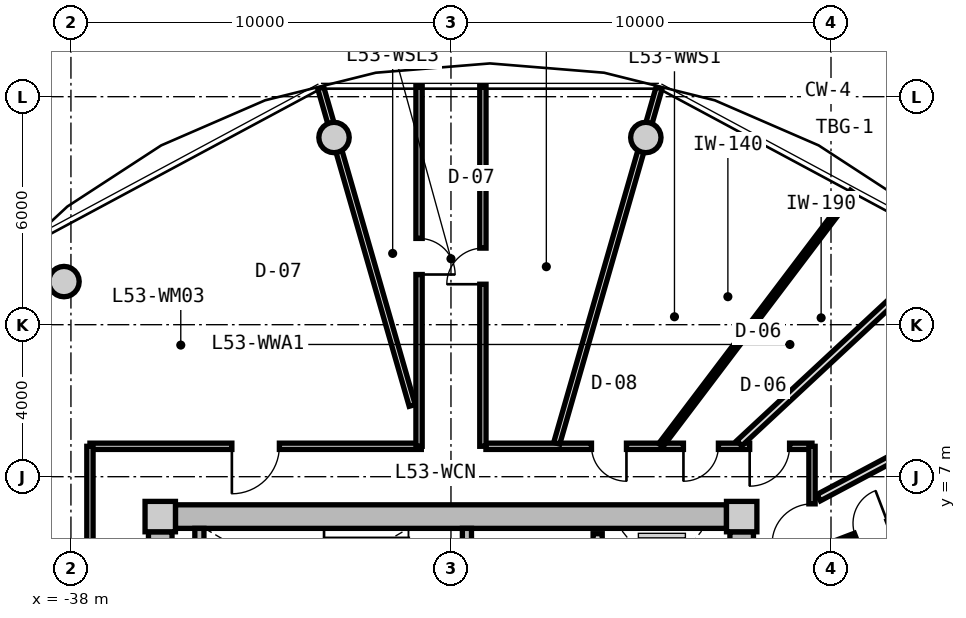
"""IFC4 building model, lengths in metres.
Left out: names, types, materials, properties, quantities, classifications, styles, units other than length and angle.
Written with IfcOpenShell. Run it as: python <this file> out.ifc"""

import sys

from ifc_helpers import new_model, si_unit, direction, frame, frame_2d, origin, origin_2d, place, context, subcontext, project, spatial, rectangle, circle, extrude, source, transform, mapped, element, fill, save


model = new_model("IFC4")
c1 = context("Model", 3, precision=1e-05, world=origin(), true_north=direction((0.0, 1.0)))
c2 = subcontext(c1, "Body", "Model", "MODEL_VIEW")
j1 = project(units=[si_unit("LENGTHUNIT", "METRE"), si_unit("PLANEANGLEUNIT", "RADIAN")], contexts=[c1])
p1 = place(None, origin())
s1 = spatial("IfcSite", under=j1, at=p1, CompositionType="ELEMENT")
p2 = place(p1, origin())
s2 = spatial("IfcBuilding", under=s1, at=p2, CompositionType="ELEMENT")
p3 = place(p2, frame((0.0, 0.0, 170.9)))
s3 = spatial("IfcBuildingStorey", under=s2, at=p3, CompositionType="ELEMENT", Elevation=170.9)
m1 = source(origin(), c2, "Body", "SweptSolid", [
    extrude(rectangle(XDim=0.8, YDim=0.8, at=origin_2d()), origin(), (0.0, 0.0, 1.0), 3.05),
])
for number, where, z_axis, x_axis in (
    (1, (-20.35, 5.95, 0.0), (0.0, 0.0, 1.0), (1.0, 0.0, 0.0)),
    (2, (-35.65, 5.95, 0.0), (0.0, 0.0, 1.0), (1.0, 0.0, 0.0)),
):
    element("IfcColumn", number, at=place(p3, frame(where, z_axis=z_axis, x_axis=x_axis)), inside=s3, PredefinedType="COLUMN", context=c2, shape_type="MappedRepresentation", body=[
        mapped(m1, transform((0.0, 0.0, 0.0), x_axis=(1.0, 0.0, 0.0), y_axis=(0.0, 1.0, 0.0), z_axis=(0.0, 0.0, 1.0), scale=1.0)),
    ])
m2 = source(origin(), c2, "Body", "SweptSolid", [
    extrude(rectangle(XDim=14.5, YDim=0.62, at=frame_2d((7.25, 0.0))), origin(), (0.0, 0.0, 1.0), 2.81),
])
p4 = place(p3, frame((-35.25, 5.95, 0.0), z_axis=(0.0, 0.0, 1.0), x_axis=(1.0, 0.0, 0.0)))
e3 = element("IfcWall", 3, at=p4, inside=s3, PredefinedType="SHEAR", context=c2, shape_type="MappedRepresentation", body=[
    mapped(m2, transform((0.0, 0.0, 0.0), x_axis=(1.0, 0.0, 0.0), y_axis=(0.0, 1.0, 0.0), z_axis=(0.0, 0.0, 1.0), scale=1.0)),
])
m3 = source(origin(), c2, "Body", "SweptSolid", [
    extrude(rectangle(XDim=11.1, YDim=0.62, at=frame_2d((5.55, 0.0))), origin(), (0.0, 0.0, 1.0), 2.81),
])
p5 = place(p3, frame((-35.65, -5.55, 0.0), z_axis=(0.0, 0.0, 1.0), x_axis=(0.0, 1.0, 0.0)))
e4 = element("IfcWall", 4, at=p5, inside=s3, PredefinedType="SHEAR", context=c2, shape_type="MappedRepresentation", body=[
    mapped(m3, transform((0.0, 0.0, 0.0), x_axis=(1.0, 0.0, 0.0), y_axis=(0.0, 1.0, 0.0), z_axis=(0.0, 0.0, 1.0), scale=1.0)),
])
p6 = place(p5, frame((3.8, 0.0, 0.0)))
e5 = element("IfcOpeningElement", 5, at=p6, cuts=e4, PredefinedType="OPENING", context=c2, shape_type="SweptSolid", body=[
    extrude(rectangle(XDim=1.2, YDim=2.15, at=frame_2d((0.6, 1.075))), frame((0.0, 0.32, 0.0), z_axis=(0.0, -1.0, 0.0), x_axis=(1.0, 0.0, 0.0)), (0.0, 0.0, 1.0), 0.64),
])
p7 = place(p3, frame((-20.35, 5.55, 0.0), z_axis=(0.0, 0.0, 1.0), x_axis=(0.0, -1.0, 0.0)))
e6 = element("IfcWall", 6, at=p7, inside=s3, PredefinedType="SHEAR", context=c2, shape_type="MappedRepresentation", body=[
    mapped(m3, transform((0.0, 0.0, 0.0), x_axis=(1.0, 0.0, 0.0), y_axis=(0.0, 1.0, 0.0), z_axis=(0.0, 0.0, 1.0), scale=1.0)),
])
p8 = place(p7, frame((5.65, 0.0, 0.0)))
e7 = element("IfcOpeningElement", 7, at=p8, cuts=e6, PredefinedType="OPENING", context=c2, shape_type="SweptSolid", body=[
    extrude(rectangle(XDim=1.2, YDim=2.15, at=frame_2d((0.6, 1.075))), frame((0.0, 0.32, 0.0), z_axis=(0.0, -1.0, 0.0), x_axis=(1.0, 0.0, 0.0)), (0.0, 0.0, 1.0), 0.64),
])
p9 = place(p7, frame((9.3, 0.0, 0.0)))
e8 = element("IfcOpeningElement", 8, at=p9, cuts=e6, PredefinedType="OPENING", context=c2, shape_type="SweptSolid", body=[
    extrude(rectangle(XDim=1.0, YDim=2.1, at=frame_2d((0.5, 1.05))), frame((0.0, 0.32, 0.0), z_axis=(0.0, -1.0, 0.0), x_axis=(1.0, 0.0, 0.0)), (0.0, 0.0, 1.0), 0.64),
])
m4 = source(origin(), c2, "Body", "SweptSolid", [
    extrude(circle(Radius=0.4, at=origin_2d()), origin(), (0.0, 0.0, 1.0), 3.05),
])
for number, where, z_axis, x_axis in (
    (9, (-22.873, 15.926, 0.0), (0.0, 0.0, 1.0), (1.0, 0.0, 0.0)),
    (10, (-31.077, 15.926, 0.0), (0.0, 0.0, 1.0), (1.0, 0.0, 0.0)),
    (11, (-38.183, 12.135, 0.0), (0.0, 0.0, 1.0), (1.0, 0.0, 0.0)),
):
    element("IfcColumn", number, at=place(p3, frame(where, z_axis=z_axis, x_axis=x_axis)), inside=s3, PredefinedType="COLUMN", context=c2, shape_type="MappedRepresentation", body=[
        mapped(m4, transform((0.0, 0.0, 0.0), x_axis=(1.0, 0.0, 0.0), y_axis=(0.0, 1.0, 0.0), z_axis=(0.0, 0.0, 1.0), scale=1.0)),
    ])
m5 = source(origin(), c2, "Body", "SweptSolid", [
    extrude(rectangle(XDim=3.19, YDim=0.24, at=frame_2d((1.595, 0.0))), origin(), (0.0, 0.0, 1.0), 2.81),
])
p10 = place(p3, frame((-34.62, 2.45, 0.0), z_axis=(0.0, 0.0, 1.0), x_axis=(0.0, 1.0, 0.0)))
e12 = element("IfcWall", 12, at=p10, inside=s3, PredefinedType="PARTITIONING", context=c2, shape_type="MappedRepresentation", body=[
    mapped(m5, transform((0.0, 0.0, 0.0), x_axis=(1.0, 0.0, 0.0), y_axis=(0.0, 1.0, 0.0), z_axis=(0.0, 0.0, 1.0), scale=1.0)),
])
p11 = place(p3, frame((-27.58, 2.45, 0.0), z_axis=(0.0, 0.0, 1.0), x_axis=(0.0, 1.0, 0.0)))
e13 = element("IfcWall", 13, at=p11, inside=s3, PredefinedType="PARTITIONING", context=c2, shape_type="MappedRepresentation", body=[
    mapped(m5, transform((0.0, 0.0, 0.0), x_axis=(1.0, 0.0, 0.0), y_axis=(0.0, 1.0, 0.0), z_axis=(0.0, 0.0, 1.0), scale=1.0)),
])
p12 = place(p11, frame((0.55, 0.0, 0.0)))
e14 = element("IfcOpeningElement", 14, at=p12, cuts=e13, PredefinedType="OPENING", context=c2, shape_type="SweptSolid", body=[
    extrude(rectangle(XDim=1.1, YDim=2.15, at=frame_2d((0.55, 1.075))), frame((0.0, 0.13, 0.0), z_axis=(0.0, -1.0, 0.0), x_axis=(1.0, 0.0, 0.0)), (0.0, 0.0, 1.0), 0.26),
])
m6 = source(origin(), c2, "Body", "SweptSolid", [
    extrude(rectangle(XDim=5.0, YDim=0.24, at=frame_2d((2.5, 0.0))), origin(), (0.0, 0.0, 1.0), 2.795),
])
p13 = place(p3, frame((-24.14, 0.5, 0.0), z_axis=(0.0, 0.0, 1.0), x_axis=(0.0, 1.0, 0.0)))
e15 = element("IfcWall", 15, at=p13, inside=s3, PredefinedType="PARTITIONING", context=c2, shape_type="MappedRepresentation", body=[
    mapped(m6, transform((0.0, 0.0, 0.0), x_axis=(1.0, 0.0, 0.0), y_axis=(0.0, 1.0, 0.0), z_axis=(0.0, 0.0, 1.0), scale=1.0)),
])
p14 = place(p13, frame((3.05, 0.0, 0.0)))
e16 = element("IfcOpeningElement", 16, at=p14, cuts=e15, PredefinedType="OPENING", context=c2, shape_type="SweptSolid", body=[
    extrude(rectangle(XDim=1.3, YDim=2.2, at=frame_2d((0.65, 1.1))), frame((0.0, 0.13, 0.0), z_axis=(0.0, -1.0, 0.0), x_axis=(1.0, 0.0, 0.0)), (0.0, 0.0, 1.0), 0.26),
])
p15 = place(p13, frame((0.55, 0.0, 0.0)))
e17 = element("IfcOpeningElement", 17, at=p15, cuts=e15, PredefinedType="OPENING", context=c2, shape_type="SweptSolid", body=[
    extrude(rectangle(XDim=1.3, YDim=2.2, at=frame_2d((0.65, 1.1))), frame((0.0, 0.13, 0.0), z_axis=(0.0, -1.0, 0.0), x_axis=(1.0, 0.0, 0.0)), (0.0, 0.0, 1.0), 0.26),
])
m7 = source(origin(), c2, "Body", "SweptSolid", [
    extrude(rectangle(XDim=8.719, YDim=0.165, at=frame_2d((4.36, 0.0))), origin(), (0.0, 0.0, 1.0), 2.795),
])
p16 = place(p3, frame((-37.5, 7.8, 0.0), z_axis=(0.0, 0.0, 1.0), x_axis=(1.0, 0.0, 0.0)))
e18 = element("IfcWall", 18, at=p16, inside=s3, PredefinedType="PARTITIONING", context=c2, shape_type="MappedRepresentation", body=[
    mapped(m7, transform((0.0, 0.0, 0.0), x_axis=(1.0, 0.0, 0.0), y_axis=(0.0, 1.0, 0.0), z_axis=(0.0, 0.0, 1.0), scale=1.0)),
])
p17 = place(p16, frame((3.735, 0.0, 0.0)))
e19 = element("IfcOpeningElement", 19, at=p17, cuts=e18, PredefinedType="OPENING", context=c2, shape_type="SweptSolid", body=[
    extrude(rectangle(XDim=1.25, YDim=2.2, at=frame_2d((0.625, 1.1))), frame((0.0, 0.093, 0.0), z_axis=(0.0, -1.0, 0.0), x_axis=(1.0, 0.0, 0.0)), (0.0, 0.0, 1.0), 0.185),
])
m8 = source(origin(), c2, "Body", "SweptSolid", [
    extrude(rectangle(XDim=8.58, YDim=0.165, at=frame_2d((4.29, 0.0))), origin(), (0.0, 0.0, 1.0), 2.795),
])
p18 = place(p3, frame((-27.08, 7.8, 0.0), z_axis=(0.0, 0.0, 1.0), x_axis=(1.0, 0.0, 0.0)))
e20 = element("IfcWall", 20, at=p18, inside=s3, PredefinedType="PARTITIONING", context=c2, shape_type="MappedRepresentation", body=[
    mapped(m8, transform((0.0, 0.0, 0.0), x_axis=(1.0, 0.0, 0.0), y_axis=(0.0, 1.0, 0.0), z_axis=(0.0, 0.0, 1.0), scale=1.0)),
])
p19 = place(p18, frame((6.94, 0.0, 0.0)))
e21 = element("IfcOpeningElement", 21, at=p19, cuts=e20, PredefinedType="OPENING", context=c2, shape_type="SweptSolid", body=[
    extrude(rectangle(XDim=1.05, YDim=2.15, at=frame_2d((0.525, 1.075))), frame((0.0, 0.093, 0.0), z_axis=(0.0, -1.0, 0.0), x_axis=(1.0, 0.0, 0.0)), (0.0, 0.0, 1.0), 0.185),
])
p20 = place(p18, frame((5.197, 0.0, 0.0)))
e22 = element("IfcOpeningElement", 22, at=p20, cuts=e20, PredefinedType="OPENING", context=c2, shape_type="SweptSolid", body=[
    extrude(rectangle(XDim=0.92, YDim=2.1, at=frame_2d((0.46, 1.05))), frame((0.0, 0.093, 0.0), z_axis=(0.0, -1.0, 0.0), x_axis=(1.0, 0.0, 0.0)), (0.0, 0.0, 1.0), 0.185),
])
p21 = place(p18, frame((2.778, 0.0, 0.0)))
e23 = element("IfcOpeningElement", 23, at=p21, cuts=e20, PredefinedType="OPENING", context=c2, shape_type="SweptSolid", body=[
    extrude(rectangle(XDim=0.92, YDim=2.1, at=frame_2d((0.46, 1.05))), frame((0.0, 0.093, 0.0), z_axis=(0.0, -1.0, 0.0), x_axis=(1.0, 0.0, 0.0)), (0.0, 0.0, 1.0), 0.185),
])
m9 = source(origin(), c2, "Body", "SweptSolid", [
    extrude(rectangle(XDim=6.88, YDim=0.165, at=frame_2d((3.44, 0.0))), origin(), (0.0, 0.0, 1.0), 2.795),
])
p22 = place(p3, frame((-37.5, 0.92, 0.0), z_axis=(0.0, 0.0, 1.0), x_axis=(0.0, 1.0, 0.0)))
e24 = element("IfcWall", 24, at=p22, inside=s3, PredefinedType="PARTITIONING", context=c2, shape_type="MappedRepresentation", body=[
    mapped(m9, transform((0.0, 0.0, 0.0), x_axis=(1.0, 0.0, 0.0), y_axis=(0.0, 1.0, 0.0), z_axis=(0.0, 0.0, 1.0), scale=1.0)),
])
p23 = place(p3, frame((-18.5, 7.8, 0.0), z_axis=(0.0, 0.0, 1.0), x_axis=(0.0, -1.0, 0.0)))
e25 = element("IfcWall", 25, at=p23, inside=s3, PredefinedType="PARTITIONING", context=c2, shape_type="MappedRepresentation", body=[
    mapped(m9, transform((0.0, 0.0, 0.0), x_axis=(1.0, 0.0, 0.0), y_axis=(0.0, 1.0, 0.0), z_axis=(0.0, 0.0, 1.0), scale=1.0)),
])
p24 = place(p23, frame((1.515, 0.0, 0.0)))
e26 = element("IfcOpeningElement", 26, at=p24, cuts=e25, PredefinedType="OPENING", context=c2, shape_type="SweptSolid", body=[
    extrude(rectangle(XDim=1.05, YDim=2.15, at=frame_2d((0.525, 1.075))), frame((0.0, 0.093, 0.0), z_axis=(0.0, -1.0, 0.0), x_axis=(1.0, 0.0, 0.0)), (0.0, 0.0, 1.0), 0.185),
])
m10 = source(origin(), c2, "Body", "SweptSolid", [
    extrude(rectangle(XDim=9.73, YDim=0.165, at=frame_2d((4.865, 0.0))), origin(), (0.0, 0.0, 1.0), 2.345),
])
p25 = place(p3, frame((-25.217, 7.88, 0.0), z_axis=(0.0, 0.0, 1.0), x_axis=(0.27679492614, 0.960929013436, 0.0)))
e27 = element("IfcWall", 27, at=p25, inside=s3, PredefinedType="PARTITIONING", context=c2, shape_type="MappedRepresentation", body=[
    mapped(m10, transform((0.0, 0.0, 0.0), x_axis=(1.0, 0.0, 0.0), y_axis=(0.0, 1.0, 0.0), z_axis=(0.0, 0.0, 1.0), scale=1.0)),
])
m11 = source(origin(), c2, "Body", "SweptSolid", [
    extrude(rectangle(XDim=8.695, YDim=0.165, at=frame_2d((4.348, 0.0))), origin(), (0.0, 0.0, 1.0), 2.345),
])
p26 = place(p3, frame((-29.02, 8.875, 0.0), z_axis=(0.0, 0.0, 1.0), x_axis=(-0.276797231892, 0.960928349263, 0.0)))
e28 = element("IfcWall", 28, at=p26, inside=s3, PredefinedType="PARTITIONING", context=c2, shape_type="MappedRepresentation", body=[
    mapped(m11, transform((0.0, 0.0, 0.0), x_axis=(1.0, 0.0, 0.0), y_axis=(0.0, 1.0, 0.0), z_axis=(0.0, 0.0, 1.0), scale=1.0)),
])
m12 = source(origin(), c2, "Body", "SweptSolid", [
    extrude(rectangle(XDim=6.193, YDim=0.165, at=frame_2d((3.096, 0.0))), origin(), (0.0, 0.0, 1.0), 2.345),
])
p27 = place(p3, frame((-37.58, 4.419, 0.0), z_axis=(0.0, 0.0, 1.0), x_axis=(-0.970309243466, 0.241867674657, 0.0)))
e29 = element("IfcWall", 29, at=p27, inside=s3, PredefinedType="PARTITIONING", context=c2, shape_type="MappedRepresentation", body=[
    mapped(m12, transform((0.0, 0.0, 0.0), x_axis=(1.0, 0.0, 0.0), y_axis=(0.0, 1.0, 0.0), z_axis=(0.0, 0.0, 1.0), scale=1.0)),
])
m13 = source(origin(), c2, "Body", "SweptSolid", [
    extrude(rectangle(XDim=8.305, YDim=0.165, at=frame_2d((4.153, 0.0))), origin(), (0.0, 0.0, 1.0), 2.345),
])
p28 = place(p3, frame((-18.42, 3.908, 0.0), z_axis=(0.0, 0.0, 1.0), x_axis=(0.970309994378, 0.241864662175, 0.0)))
e30 = element("IfcWall", 30, at=p28, inside=s3, PredefinedType="PARTITIONING", context=c2, shape_type="MappedRepresentation", body=[
    mapped(m13, transform((0.0, 0.0, 0.0), x_axis=(1.0, 0.0, 0.0), y_axis=(0.0, 1.0, 0.0), z_axis=(0.0, 0.0, 1.0), scale=1.0)),
])
m14 = source(origin(), c2, "Body", "SweptSolid", [
    extrude(rectangle(XDim=9.48, YDim=0.165, at=frame_2d((4.74, 0.0))), origin(), (0.0, 0.0, 1.0), 2.795),
])
p29 = place(p3, frame((-28.84, 7.8, 0.0), z_axis=(0.0, 0.0, 1.0), x_axis=(0.0, 1.0, 0.0)))
e31 = element("IfcWall", 31, at=p29, inside=s3, PredefinedType="PARTITIONING", context=c2, shape_type="MappedRepresentation", body=[
    mapped(m14, transform((0.0, 0.0, 0.0), x_axis=(1.0, 0.0, 0.0), y_axis=(0.0, 1.0, 0.0), z_axis=(0.0, 0.0, 1.0), scale=1.0)),
])
p30 = place(p29, frame((4.521, 0.0, 0.0)))
e32 = element("IfcOpeningElement", 32, at=p30, cuts=e31, PredefinedType="OPENING", context=c2, shape_type="SweptSolid", body=[
    extrude(rectangle(XDim=0.95, YDim=2.1, at=frame_2d((0.475, 1.05))), frame((0.0, 0.093, 0.0), z_axis=(0.0, -1.0, 0.0), x_axis=(1.0, 0.0, 0.0)), (0.0, 0.0, 1.0), 0.185),
])
p31 = place(p3, frame((-27.16, 17.28, 0.0), z_axis=(0.0, 0.0, 1.0), x_axis=(0.0, -1.0, 0.0)))
e33 = element("IfcWall", 33, at=p31, inside=s3, PredefinedType="PARTITIONING", context=c2, shape_type="MappedRepresentation", body=[
    mapped(m14, transform((0.0, 0.0, 0.0), x_axis=(1.0, 0.0, 0.0), y_axis=(0.0, 1.0, 0.0), z_axis=(0.0, 0.0, 1.0), scale=1.0)),
])
p32 = place(p31, frame((4.265, 0.0, 0.0)))
e34 = element("IfcOpeningElement", 34, at=p32, cuts=e33, PredefinedType="OPENING", context=c2, shape_type="SweptSolid", body=[
    extrude(rectangle(XDim=0.95, YDim=2.1, at=frame_2d((0.475, 1.05))), frame((0.0, 0.093, 0.0), z_axis=(0.0, -1.0, 0.0), x_axis=(1.0, 0.0, 0.0)), (0.0, 0.0, 1.0), 0.185),
])
m15 = source(origin(), c2, "Body", "SweptSolid", [
    extrude(rectangle(XDim=7.648, YDim=0.19, at=frame_2d((3.824, 0.0))), origin(), (0.0, 0.0, 1.0), 2.345),
])
p33 = place(p3, frame((-20.413, 7.88, 0.0), z_axis=(0.0, 0.0, 1.0), x_axis=(0.732182665826, 0.681108320213, 0.0)))
e35 = element("IfcWall", 35, at=p33, inside=s3, PredefinedType="PARTITIONING", context=c2, shape_type="MappedRepresentation", body=[
    mapped(m15, transform((0.0, 0.0, 0.0), x_axis=(1.0, 0.0, 0.0), y_axis=(0.0, 1.0, 0.0), z_axis=(0.0, 0.0, 1.0), scale=1.0)),
])
m16 = source(origin(), c2, "Body", "SweptSolid", [
    extrude(rectangle(XDim=6.499, YDim=0.19, at=frame_2d((3.25, 0.0))), origin(), (0.0, 0.0, 1.0), 2.795),
])
p34 = place(p3, frame((-18.324, 6.449, 0.0), z_axis=(0.0, 0.0, 1.0), x_axis=(0.882715595921, 0.469907625729, 0.0)))
e36 = element("IfcWall", 36, at=p34, inside=s3, PredefinedType="PARTITIONING", context=c2, shape_type="MappedRepresentation", body=[
    mapped(m16, transform((0.0, 0.0, 0.0), x_axis=(1.0, 0.0, 0.0), y_axis=(0.0, 1.0, 0.0), z_axis=(0.0, 0.0, 1.0), scale=1.0)),
])
m17 = source(origin(), c2, "Body", "SweptSolid", [
    extrude(rectangle(XDim=3.295, YDim=0.14, at=frame_2d((1.647, 0.0))), origin(), (0.0, 0.0, 1.0), 2.795),
])
p35 = place(p3, frame((-18.47, 5.023, 0.0), z_axis=(0.0, 0.0, 1.0), x_axis=(0.934202224769, 0.356743890258, 0.0)))
e37 = element("IfcWall", 37, at=p35, inside=s3, PredefinedType="PARTITIONING", context=c2, shape_type="MappedRepresentation", body=[
    mapped(m17, transform((0.0, 0.0, 0.0), x_axis=(1.0, 0.0, 0.0), y_axis=(0.0, 1.0, 0.0), z_axis=(0.0, 0.0, 1.0), scale=1.0)),
])
p36 = place(p35, frame((1.188, 0.0, 0.0)))
e38 = element("IfcOpeningElement", 38, at=p36, cuts=e37, PredefinedType="OPENING", context=c2, shape_type="SweptSolid", body=[
    extrude(rectangle(XDim=0.92, YDim=2.1, at=frame_2d((0.46, 1.05))), frame((0.0, 0.08, 0.0), z_axis=(0.0, -1.0, 0.0), x_axis=(1.0, 0.0, 0.0)), (0.0, 0.0, 1.0), 0.16),
])
m18 = source(origin(), c2, "Body", "SweptSolid", [
    extrude(rectangle(XDim=8.359, YDim=0.14, at=frame_2d((4.18, 0.0))), origin(), (0.0, 0.0, 1.0), 2.795),
])
p37 = place(p3, frame((-22.477, 7.83, 0.0), z_axis=(0.0, 0.0, 1.0), x_axis=(0.603265985309, 0.797540062297, 0.0)))
e39 = element("IfcWall", 39, at=p37, inside=s3, PredefinedType="PARTITIONING", context=c2, shape_type="MappedRepresentation", body=[
    mapped(m18, transform((0.0, 0.0, 0.0), x_axis=(1.0, 0.0, 0.0), y_axis=(0.0, 1.0, 0.0), z_axis=(0.0, 0.0, 1.0), scale=1.0)),
])
m19 = source(origin(), c2, "Body", "SweptSolid", [
    extrude(rectangle(XDim=0.95, YDim=2.1, at=frame_2d((0.475, 1.05))), frame((0.0, 0.025, 0.0), z_axis=(0.0, -1.0, 0.0), x_axis=(1.0, 0.0, 0.0)), (0.0, 0.0, 1.0), 0.05),
])
p38 = place(p30, frame((0.95, 0.0, 0.0), z_axis=(0.0, 0.0, 1.0), x_axis=(-1.0, 0.0, 0.0)))
e40 = element("IfcDoor", 40, at=p38, inside=s3, OperationType="SINGLE_SWING_RIGHT", PredefinedType="DOOR", context=c2, shape_type="MappedRepresentation", body=[
    mapped(m19, transform((0.0, 0.0, 0.0), x_axis=(1.0, 0.0, 0.0), y_axis=(0.0, 1.0, 0.0), z_axis=(0.0, 0.0, 1.0), scale=1.0)),
])
fill(e32, e40)
p39 = place(p32, frame((0.95, 0.0, 0.0), z_axis=(0.0, 0.0, 1.0), x_axis=(-1.0, 0.0, 0.0)))
e41 = element("IfcDoor", 41, at=p39, inside=s3, OperationType="SINGLE_SWING_LEFT", PredefinedType="DOOR", context=c2, shape_type="MappedRepresentation", body=[
    mapped(m19, transform((0.0, 0.0, 0.0), x_axis=(1.0, 0.0, 0.0), y_axis=(0.0, 1.0, 0.0), z_axis=(0.0, 0.0, 1.0), scale=1.0)),
])
fill(e34, e41)
m20 = source(origin(), c2, "Body", "SweptSolid", [
    extrude(rectangle(XDim=1.05, YDim=2.15, at=frame_2d((0.525, 1.075))), frame((0.0, 0.025, 0.0), z_axis=(0.0, -1.0, 0.0), x_axis=(1.0, 0.0, 0.0)), (0.0, 0.0, 1.0), 0.05),
])
p40 = place(p24, frame((1.05, 0.0, 0.0), z_axis=(0.0, 0.0, 1.0), x_axis=(-1.0, 0.0, 0.0)))
e42 = element("IfcDoor", 42, at=p40, inside=s3, OperationType="SINGLE_SWING_LEFT", PredefinedType="DOOR", context=c2, shape_type="MappedRepresentation", body=[
    mapped(m20, transform((0.0, 0.0, 0.0), x_axis=(1.0, 0.0, 0.0), y_axis=(0.0, 1.0, 0.0), z_axis=(0.0, 0.0, 1.0), scale=1.0)),
])
fill(e26, e42)
m21 = source(origin(), c2, "Body", "SweptSolid", [
    extrude(rectangle(XDim=0.92, YDim=2.1, at=frame_2d((0.46, 1.05))), frame((0.0, 0.025, 0.0), z_axis=(0.0, -1.0, 0.0), x_axis=(1.0, 0.0, 0.0)), (0.0, 0.0, 1.0), 0.05),
])
p41 = place(p36, origin())
e43 = element("IfcDoor", 43, at=p41, inside=s3, OperationType="SINGLE_SWING_RIGHT", PredefinedType="DOOR", context=c2, shape_type="MappedRepresentation", body=[
    mapped(m21, transform((0.0, 0.0, 0.0), x_axis=(1.0, 0.0, 0.0), y_axis=(0.0, 1.0, 0.0), z_axis=(0.0, 0.0, 1.0), scale=1.0)),
])
fill(e38, e43)
p42 = place(p19, frame((1.05, 0.0, 0.0), z_axis=(0.0, 0.0, 1.0), x_axis=(-1.0, 0.0, 0.0)))
e44 = element("IfcDoor", 44, at=p42, inside=s3, OperationType="SINGLE_SWING_RIGHT", PredefinedType="DOOR", context=c2, shape_type="MappedRepresentation", body=[
    mapped(m20, transform((0.0, 0.0, 0.0), x_axis=(1.0, 0.0, 0.0), y_axis=(0.0, 1.0, 0.0), z_axis=(0.0, 0.0, 1.0), scale=1.0)),
])
fill(e21, e44)
p43 = place(p20, frame((0.92, 0.0, 0.0), z_axis=(0.0, 0.0, 1.0), x_axis=(-1.0, 0.0, 0.0)))
e45 = element("IfcDoor", 45, at=p43, inside=s3, OperationType="SINGLE_SWING_RIGHT", PredefinedType="DOOR", context=c2, shape_type="MappedRepresentation", body=[
    mapped(m21, transform((0.0, 0.0, 0.0), x_axis=(1.0, 0.0, 0.0), y_axis=(0.0, 1.0, 0.0), z_axis=(0.0, 0.0, 1.0), scale=1.0)),
])
fill(e22, e45)
p44 = place(p21, frame((0.92, 0.0, 0.0), z_axis=(0.0, 0.0, 1.0), x_axis=(-1.0, 0.0, 0.0)))
e46 = element("IfcDoor", 46, at=p44, inside=s3, OperationType="SINGLE_SWING_LEFT", PredefinedType="DOOR", context=c2, shape_type="MappedRepresentation", body=[
    mapped(m21, transform((0.0, 0.0, 0.0), x_axis=(1.0, 0.0, 0.0), y_axis=(0.0, 1.0, 0.0), z_axis=(0.0, 0.0, 1.0), scale=1.0)),
])
fill(e23, e46)
m22 = source(origin(), c2, "Body", "SweptSolid", [
    extrude(rectangle(XDim=1.25, YDim=2.2, at=frame_2d((0.625, 1.1))), frame((0.0, 0.025, 0.0), z_axis=(0.0, -1.0, 0.0), x_axis=(1.0, 0.0, 0.0)), (0.0, 0.0, 1.0), 0.05),
])
p45 = place(p17, frame((1.25, 0.0, 0.0), z_axis=(0.0, 0.0, 1.0), x_axis=(-1.0, 0.0, 0.0)))
e47 = element("IfcDoor", 47, at=p45, inside=s3, OperationType="SINGLE_SWING_RIGHT", PredefinedType="DOOR", context=c2, shape_type="MappedRepresentation", body=[
    mapped(m22, transform((0.0, 0.0, 0.0), x_axis=(1.0, 0.0, 0.0), y_axis=(0.0, 1.0, 0.0), z_axis=(0.0, 0.0, 1.0), scale=1.0)),
])
fill(e19, e47)
save(model, sys.argv[1])
